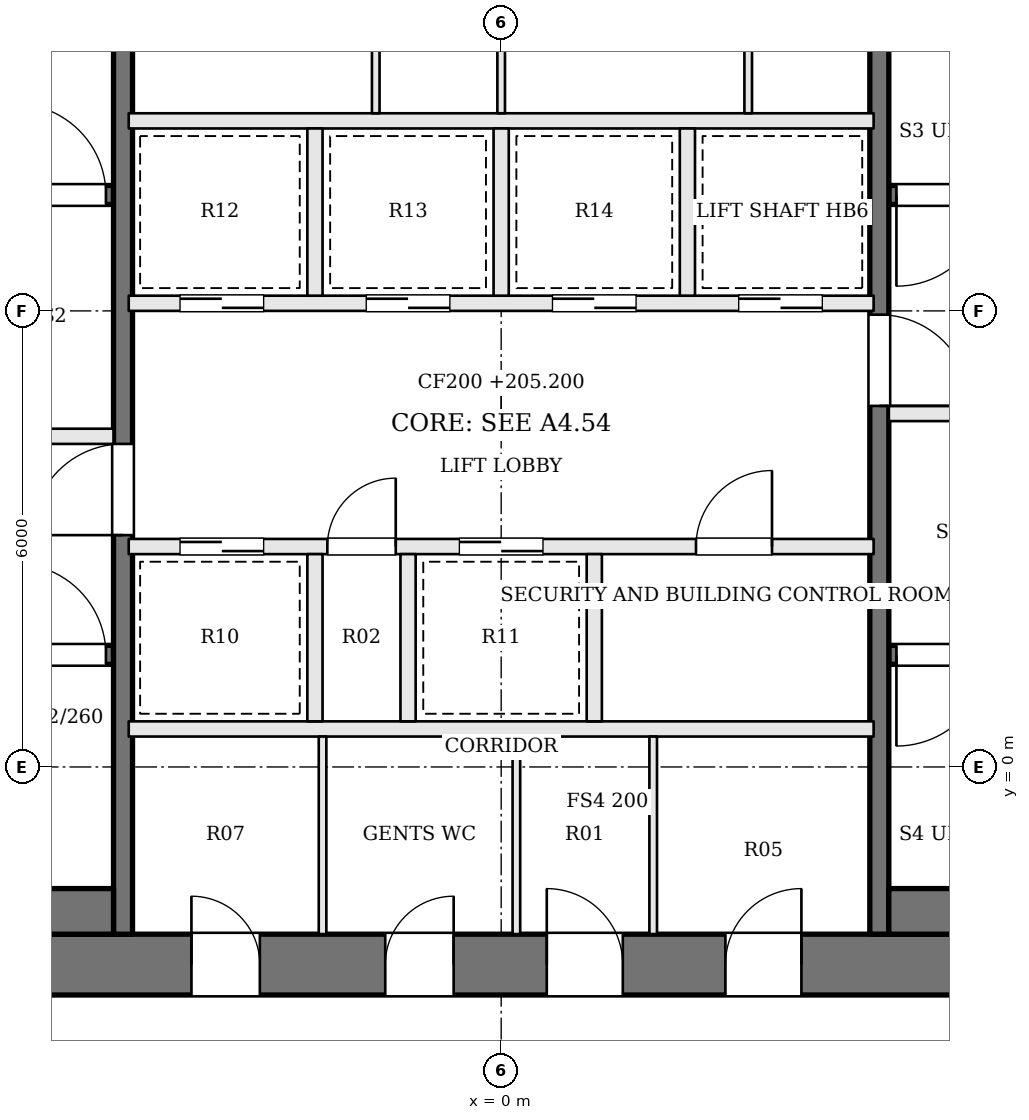
"""IFC4 building model, lengths in metres.
Left out: names, types, materials, properties, quantities, classifications, styles, units other than length and angle.
Written with IfcOpenShell. Run it as: python <this file> out.ifc"""

import sys

from ifc_helpers import new_model, si_unit, direction, frame, frame_2d, origin, place, context, subcontext, project, spatial, rectangle, extrude, element, fill, save


model = new_model("IFC4")
c1 = context("Model", 3, precision=1e-05, world=origin(), true_north=direction((0.0, 1.0)))
c2 = subcontext(c1, "Body", "Model", "MODEL_VIEW")
j1 = project(units=[si_unit("LENGTHUNIT", "METRE"), si_unit("PLANEANGLEUNIT", "RADIAN")], contexts=[c1])
p1 = place(None, origin())
s1 = spatial("IfcSite", under=j1, at=p1, CompositionType="ELEMENT")
p2 = place(p1, origin())
s2 = spatial("IfcBuilding", under=s1, at=p2, CompositionType="ELEMENT")
p3 = place(p2, frame((0.0, 0.0, 205.2)))
s3 = spatial("IfcBuildingStorey", under=s2, at=p3, CompositionType="ELEMENT", Elevation=205.2)
p4 = place(p3, frame((-13.0, -2.6, 0.0), z_axis=(0.0, 0.0, 1.0), x_axis=(1.0, 0.0, 0.0)))
e1 = element("IfcWall", 1, at=p4, inside=s3, PredefinedType="SHEAR", context=c2, shape_type="SweptSolid", body=[
    extrude(rectangle(XDim=26.0, YDim=0.8, at=frame_2d((13.0, 0.0))), origin(), (0.0, 0.0, 1.0), 3.9),
])
p5 = place(p4, frame((8.925, 0.0, 0.0)))
e2 = element("IfcOpeningElement", 2, at=p5, cuts=e1, PredefinedType="OPENING", context=c2, shape_type="SweptSolid", body=[
    extrude(rectangle(XDim=0.9, YDim=2.1, at=frame_2d((0.45, 1.05))), frame((0.0, 0.41, 0.0), z_axis=(0.0, -1.0, 0.0), x_axis=(1.0, 0.0, 0.0)), (0.0, 0.0, 1.0), 0.82),
])
p6 = place(p4, frame((11.475, 0.0, 0.0)))
e3 = element("IfcOpeningElement", 3, at=p6, cuts=e1, PredefinedType="OPENING", context=c2, shape_type="SweptSolid", body=[
    extrude(rectangle(XDim=0.9, YDim=2.1, at=frame_2d((0.45, 1.05))), frame((0.0, 0.41, 0.0), z_axis=(0.0, -1.0, 0.0), x_axis=(1.0, 0.0, 0.0)), (0.0, 0.0, 1.0), 0.82),
])
p7 = place(p4, frame((13.6, 0.0, 0.0)))
e4 = element("IfcOpeningElement", 4, at=p7, cuts=e1, PredefinedType="OPENING", context=c2, shape_type="SweptSolid", body=[
    extrude(rectangle(XDim=1.0, YDim=2.1, at=frame_2d((0.5, 1.05))), frame((0.0, 0.41, 0.0), z_axis=(0.0, -1.0, 0.0), x_axis=(1.0, 0.0, 0.0)), (0.0, 0.0, 1.0), 0.82),
])
p8 = place(p4, frame((15.95, 0.0, 0.0)))
e5 = element("IfcOpeningElement", 5, at=p8, cuts=e1, PredefinedType="OPENING", context=c2, shape_type="SweptSolid", body=[
    extrude(rectangle(XDim=1.0, YDim=2.1, at=frame_2d((0.5, 1.05))), frame((0.0, 0.41, 0.0), z_axis=(0.0, -1.0, 0.0), x_axis=(1.0, 0.0, 0.0)), (0.0, 0.0, 1.0), 0.82),
])
p9 = place(p3, frame((-12.2, 1.475, 0.0), z_axis=(0.0, 0.0, 1.0), x_axis=(1.0, 0.0, 0.0)))
e6 = element("IfcWall", 6, at=p9, inside=s3, PredefinedType="SOLIDWALL", context=c2, shape_type="SweptSolid", body=[
    extrude(rectangle(XDim=7.1, YDim=0.25, at=frame_2d((3.55, 0.0))), origin(), (0.0, 0.0, 1.0), 3.7),
])
p10 = place(p9, frame((5.8, 0.0, 0.0)))
e7 = element("IfcOpeningElement", 7, at=p10, cuts=e6, PredefinedType="OPENING", context=c2, shape_type="SweptSolid", body=[
    extrude(rectangle(XDim=1.2, YDim=2.1, at=frame_2d((0.6, 1.05))), frame((0.0, 0.135, 0.0), z_axis=(0.0, -1.0, 0.0), x_axis=(1.0, 0.0, 0.0)), (0.0, 0.0, 1.0), 0.27),
])
p11 = place(p3, frame((12.2, 7.525, 0.0), z_axis=(0.0, 0.0, 1.0), x_axis=(-1.0, 0.0, 0.0)))
e8 = element("IfcWall", 8, at=p11, inside=s3, PredefinedType="SOLIDWALL", context=c2, shape_type="SweptSolid", body=[
    extrude(rectangle(XDim=7.1, YDim=0.25, at=frame_2d((3.55, 0.0))), origin(), (0.0, 0.0, 1.0), 3.7),
])
p12 = place(p11, frame((5.8, 0.0, 0.0)))
e9 = element("IfcOpeningElement", 9, at=p12, cuts=e8, PredefinedType="OPENING", context=c2, shape_type="SweptSolid", body=[
    extrude(rectangle(XDim=1.2, YDim=2.1, at=frame_2d((0.6, 1.05))), frame((0.0, 0.135, 0.0), z_axis=(0.0, -1.0, 0.0), x_axis=(1.0, 0.0, 0.0)), (0.0, 0.0, 1.0), 0.27),
])
p13 = place(p3, frame((-12.2, 4.35, 0.0), z_axis=(0.0, 0.0, 1.0), x_axis=(1.0, 0.0, 0.0)))
e10 = element("IfcWall", 10, at=p13, inside=s3, PredefinedType="SOLIDWALL", context=c2, shape_type="SweptSolid", body=[
    extrude(rectangle(XDim=7.1, YDim=0.2, at=frame_2d((3.55, 0.0))), origin(), (0.0, 0.0, 1.0), 3.7),
])
p14 = place(p13, frame((4.4, 0.0, 0.0)))
e11 = element("IfcOpeningElement", 11, at=p14, cuts=e10, PredefinedType="OPENING", context=c2, shape_type="SweptSolid", body=[
    extrude(rectangle(XDim=1.2, YDim=2.1, at=frame_2d((0.6, 1.05))), frame((0.0, 0.11, 0.0), z_axis=(0.0, -1.0, 0.0), x_axis=(1.0, 0.0, 0.0)), (0.0, 0.0, 1.0), 0.22),
])
p15 = place(p13, frame((1.1, 0.0, 0.0)))
e12 = element("IfcOpeningElement", 12, at=p15, cuts=e10, PredefinedType="OPENING", context=c2, shape_type="SweptSolid", body=[
    extrude(rectangle(XDim=1.2, YDim=2.1, at=frame_2d((0.6, 1.05))), frame((0.0, 0.11, 0.0), z_axis=(0.0, -1.0, 0.0), x_axis=(1.0, 0.0, 0.0)), (0.0, 0.0, 1.0), 0.22),
])
p16 = place(p3, frame((12.2, 4.65, 0.0), z_axis=(0.0, 0.0, 1.0), x_axis=(-1.0, 0.0, 0.0)))
e13 = element("IfcWall", 13, at=p16, inside=s3, PredefinedType="SOLIDWALL", context=c2, shape_type="SweptSolid", body=[
    extrude(rectangle(XDim=7.1, YDim=0.2, at=frame_2d((3.55, 0.0))), origin(), (0.0, 0.0, 1.0), 3.7),
])
p17 = place(p16, frame((4.4, 0.0, 0.0)))
e14 = element("IfcOpeningElement", 14, at=p17, cuts=e13, PredefinedType="OPENING", context=c2, shape_type="SweptSolid", body=[
    extrude(rectangle(XDim=1.2, YDim=2.1, at=frame_2d((0.6, 1.05))), frame((0.0, 0.11, 0.0), z_axis=(0.0, -1.0, 0.0), x_axis=(1.0, 0.0, 0.0)), (0.0, 0.0, 1.0), 0.22),
])
p18 = place(p16, frame((1.1, 0.0, 0.0)))
e15 = element("IfcOpeningElement", 15, at=p18, cuts=e13, PredefinedType="OPENING", context=c2, shape_type="SweptSolid", body=[
    extrude(rectangle(XDim=1.2, YDim=2.1, at=frame_2d((0.6, 1.05))), frame((0.0, 0.11, 0.0), z_axis=(0.0, -1.0, 0.0), x_axis=(1.0, 0.0, 0.0)), (0.0, 0.0, 1.0), 0.22),
])
p19 = place(p3, frame((-12.2, 7.525, 0.0), z_axis=(0.0, 0.0, 1.0), x_axis=(1.0, 0.0, 0.0)))
e16 = element("IfcWall", 16, at=p19, inside=s3, PredefinedType="SOLIDWALL", context=c2, shape_type="SweptSolid", body=[
    extrude(rectangle(XDim=7.1, YDim=0.25, at=frame_2d((3.55, 0.0))), origin(), (0.0, 0.0, 1.0), 3.7),
])
p20 = place(p19, frame((5.8, 0.0, 0.0)))
e17 = element("IfcOpeningElement", 17, at=p20, cuts=e16, PredefinedType="OPENING", context=c2, shape_type="SweptSolid", body=[
    extrude(rectangle(XDim=1.2, YDim=2.1, at=frame_2d((0.6, 1.05))), frame((0.0, 0.135, 0.0), z_axis=(0.0, -1.0, 0.0), x_axis=(1.0, 0.0, 0.0)), (0.0, 0.0, 1.0), 0.27),
])
p21 = place(p3, frame((12.2, 1.475, 0.0), z_axis=(0.0, 0.0, 1.0), x_axis=(-1.0, 0.0, 0.0)))
e18 = element("IfcWall", 18, at=p21, inside=s3, PredefinedType="SOLIDWALL", context=c2, shape_type="SweptSolid", body=[
    extrude(rectangle(XDim=7.1, YDim=0.25, at=frame_2d((3.55, 0.0))), origin(), (0.0, 0.0, 1.0), 3.7),
])
p22 = place(p21, frame((5.8, 0.0, 0.0)))
e19 = element("IfcOpeningElement", 19, at=p22, cuts=e18, PredefinedType="OPENING", context=c2, shape_type="SweptSolid", body=[
    extrude(rectangle(XDim=1.2, YDim=2.1, at=frame_2d((0.6, 1.05))), frame((0.0, 0.135, 0.0), z_axis=(0.0, -1.0, 0.0), x_axis=(1.0, 0.0, 0.0)), (0.0, 0.0, 1.0), 0.27),
])
p23 = place(p3, frame((-4.975, -2.2, 0.0), z_axis=(0.0, 0.0, 1.0), x_axis=(0.0, 1.0, 0.0)))
e20 = element("IfcWall", 20, at=p23, inside=s3, PredefinedType="SOLIDWALL", context=c2, shape_type="SweptSolid", body=[
    extrude(rectangle(XDim=13.4, YDim=0.25, at=frame_2d((6.7, 0.0))), origin(), (0.0, 0.0, 1.0), 3.7),
])
p24 = place(p23, frame((5.25, 0.0, 0.0)))
e21 = element("IfcOpeningElement", 21, at=p24, cuts=e20, PredefinedType="OPENING", context=c2, shape_type="SweptSolid", body=[
    extrude(rectangle(XDim=1.2, YDim=2.1, at=frame_2d((0.6, 1.05))), frame((0.0, 0.135, 0.0), z_axis=(0.0, -1.0, 0.0), x_axis=(1.0, 0.0, 0.0)), (0.0, 0.0, 1.0), 0.27),
])
p25 = place(p3, frame((4.975, 11.2, 0.0), z_axis=(0.0, 0.0, 1.0), x_axis=(0.0, -1.0, 0.0)))
e22 = element("IfcWall", 22, at=p25, inside=s3, PredefinedType="SOLIDWALL", context=c2, shape_type="SweptSolid", body=[
    extrude(rectangle(XDim=13.4, YDim=0.25, at=frame_2d((6.7, 0.0))), origin(), (0.0, 0.0, 1.0), 3.7),
])
p26 = place(p25, frame((5.25, 0.0, 0.0)))
e23 = element("IfcOpeningElement", 23, at=p26, cuts=e22, PredefinedType="OPENING", context=c2, shape_type="SweptSolid", body=[
    extrude(rectangle(XDim=1.2, YDim=2.1, at=frame_2d((0.6, 1.05))), frame((0.0, 0.135, 0.0), z_axis=(0.0, -1.0, 0.0), x_axis=(1.0, 0.0, 0.0)), (0.0, 0.0, 1.0), 0.27),
])
for number, where, z_axis, x_axis in (
    (24, (-12.2, -1.9, 0.0), (0.0, 0.0, 1.0), (1.0, 0.0, 0.0)),
    (25, (12.2, -1.9, 0.0), (0.0, 0.0, 1.0), (-1.0, 0.0, 0.0)),
):
    element("IfcWall", number, at=place(p3, frame(where, z_axis=z_axis, x_axis=x_axis)), inside=s3, PredefinedType="SOLIDWALL", context=c2, shape_type="SweptSolid", body=[
        extrude(rectangle(XDim=7.1, YDim=0.6, at=frame_2d((3.55, 0.0))), origin(), (0.0, 0.0, 1.0), 3.7),
    ])
p27 = place(p3, frame((-4.9, 0.5, 0.0), z_axis=(0.0, 0.0, 1.0), x_axis=(1.0, 0.0, 0.0)))
e26 = element("IfcWall", 26, at=p27, inside=s3, PredefinedType="SOLIDWALL", context=c2, shape_type="SweptSolid", body=[
    extrude(rectangle(XDim=9.8, YDim=0.2, at=frame_2d((4.9, 0.0))), origin(), (0.0, 0.0, 1.0), 3.7),
])
p28 = place(p3, frame((-4.9, 2.9, 0.0), z_axis=(0.0, 0.0, 1.0), x_axis=(1.0, 0.0, 0.0)))
e27 = element("IfcWall", 27, at=p28, inside=s3, PredefinedType="SOLIDWALL", context=c2, shape_type="SweptSolid", body=[
    extrude(rectangle(XDim=9.8, YDim=0.2, at=frame_2d((4.9, 0.0))), origin(), (0.0, 0.0, 1.0), 3.7),
])
p29 = place(p28, frame((0.675, 0.0, 0.0)))
e28 = element("IfcOpeningElement", 28, at=p29, cuts=e27, PredefinedType="OPENING", context=c2, shape_type="SweptSolid", body=[
    extrude(rectangle(XDim=1.1, YDim=2.1, at=frame_2d((0.55, 1.05))), frame((0.0, 0.11, 0.0), z_axis=(0.0, -1.0, 0.0), x_axis=(1.0, 0.0, 0.0)), (0.0, 0.0, 1.0), 0.22),
])
p30 = place(p28, frame((2.613, 0.0, 0.0)))
e29 = element("IfcOpeningElement", 29, at=p30, cuts=e27, PredefinedType="OPENING", context=c2, shape_type="SweptSolid", body=[
    extrude(rectangle(XDim=0.9, YDim=2.1, at=frame_2d((0.45, 1.05))), frame((0.0, 0.11, 0.0), z_axis=(0.0, -1.0, 0.0), x_axis=(1.0, 0.0, 0.0)), (0.0, 0.0, 1.0), 0.22),
])
p31 = place(p28, frame((4.35, 0.0, 0.0)))
e30 = element("IfcOpeningElement", 30, at=p31, cuts=e27, PredefinedType="OPENING", context=c2, shape_type="SweptSolid", body=[
    extrude(rectangle(XDim=1.1, YDim=2.1, at=frame_2d((0.55, 1.05))), frame((0.0, 0.11, 0.0), z_axis=(0.0, -1.0, 0.0), x_axis=(1.0, 0.0, 0.0)), (0.0, 0.0, 1.0), 0.22),
])
p32 = place(p28, frame((7.463, 0.0, 0.0)))
e31 = element("IfcOpeningElement", 31, at=p32, cuts=e27, PredefinedType="OPENING", context=c2, shape_type="SweptSolid", body=[
    extrude(rectangle(XDim=1.0, YDim=2.1, at=frame_2d((0.5, 1.05))), frame((0.0, 0.11, 0.0), z_axis=(0.0, -1.0, 0.0), x_axis=(1.0, 0.0, 0.0)), (0.0, 0.0, 1.0), 0.22),
])
p33 = place(p3, frame((-4.9, 6.1, 0.0), z_axis=(0.0, 0.0, 1.0), x_axis=(1.0, 0.0, 0.0)))
e32 = element("IfcWall", 32, at=p33, inside=s3, PredefinedType="SOLIDWALL", context=c2, shape_type="SweptSolid", body=[
    extrude(rectangle(XDim=9.8, YDim=0.2, at=frame_2d((4.9, 0.0))), origin(), (0.0, 0.0, 1.0), 3.7),
])
p34 = place(p33, frame((0.675, 0.0, 0.0)))
e33 = element("IfcOpeningElement", 33, at=p34, cuts=e32, PredefinedType="OPENING", context=c2, shape_type="SweptSolid", body=[
    extrude(rectangle(XDim=1.1, YDim=2.1, at=frame_2d((0.55, 1.05))), frame((0.0, 0.11, 0.0), z_axis=(0.0, -1.0, 0.0), x_axis=(1.0, 0.0, 0.0)), (0.0, 0.0, 1.0), 0.22),
])
p35 = place(p33, frame((3.125, 0.0, 0.0)))
e34 = element("IfcOpeningElement", 34, at=p35, cuts=e32, PredefinedType="OPENING", context=c2, shape_type="SweptSolid", body=[
    extrude(rectangle(XDim=1.1, YDim=2.1, at=frame_2d((0.55, 1.05))), frame((0.0, 0.11, 0.0), z_axis=(0.0, -1.0, 0.0), x_axis=(1.0, 0.0, 0.0)), (0.0, 0.0, 1.0), 0.22),
])
p36 = place(p33, frame((5.575, 0.0, 0.0)))
e35 = element("IfcOpeningElement", 35, at=p36, cuts=e32, PredefinedType="OPENING", context=c2, shape_type="SweptSolid", body=[
    extrude(rectangle(XDim=1.1, YDim=2.1, at=frame_2d((0.55, 1.05))), frame((0.0, 0.11, 0.0), z_axis=(0.0, -1.0, 0.0), x_axis=(1.0, 0.0, 0.0)), (0.0, 0.0, 1.0), 0.22),
])
p37 = place(p33, frame((8.025, 0.0, 0.0)))
e36 = element("IfcOpeningElement", 36, at=p37, cuts=e32, PredefinedType="OPENING", context=c2, shape_type="SweptSolid", body=[
    extrude(rectangle(XDim=1.1, YDim=2.1, at=frame_2d((0.55, 1.05))), frame((0.0, 0.11, 0.0), z_axis=(0.0, -1.0, 0.0), x_axis=(1.0, 0.0, 0.0)), (0.0, 0.0, 1.0), 0.22),
])
p38 = place(p3, frame((-4.9, 8.5, 0.0), z_axis=(0.0, 0.0, 1.0), x_axis=(1.0, 0.0, 0.0)))
e37 = element("IfcWall", 37, at=p38, inside=s3, PredefinedType="SOLIDWALL", context=c2, shape_type="SweptSolid", body=[
    extrude(rectangle(XDim=9.8, YDim=0.2, at=frame_2d((4.9, 0.0))), origin(), (0.0, 0.0, 1.0), 3.7),
])
for number, where, z_axis, x_axis in (
    (38, (-2.45, 0.6, 0.0), (0.0, 0.0, 1.0), (0.0, 1.0, 0.0)),
    (39, (-1.225, 0.6, 0.0), (0.0, 0.0, 1.0), (0.0, 1.0, 0.0)),
    (40, (1.225, 0.6, 0.0), (0.0, 0.0, 1.0), (0.0, 1.0, 0.0)),
    (41, (-2.45, 6.2, 0.0), (0.0, 0.0, 1.0), (0.0, 1.0, 0.0)),
    (42, (0.0, 6.2, 0.0), (0.0, 0.0, 1.0), (0.0, 1.0, 0.0)),
    (43, (2.45, 6.2, 0.0), (0.0, 0.0, 1.0), (0.0, 1.0, 0.0)),
):
    element("IfcWall", number, at=place(p3, frame(where, z_axis=z_axis, x_axis=x_axis)), inside=s3, PredefinedType="SOLIDWALL", context=c2, shape_type="SweptSolid", body=[
        extrude(rectangle(XDim=2.2, YDim=0.2, at=frame_2d((1.1, 0.0))), origin(), (0.0, 0.0, 1.0), 3.7),
    ])
for number, where, z_axis, x_axis in (
    (44, (-2.35, -2.2, 0.0), (0.0, 0.0, 1.0), (0.0, 1.0, 0.0)),
    (45, (0.2, -2.2, 0.0), (0.0, 0.0, 1.0), (0.0, 1.0, 0.0)),
    (46, (2.0, -2.2, 0.0), (0.0, 0.0, 1.0), (0.0, 1.0, 0.0)),
    (47, (-1.65, 8.6, 0.0), (0.0, 0.0, 1.0), (0.0, 1.0, 0.0)),
    (48, (0.0, 8.6, 0.0), (0.0, 0.0, 1.0), (0.0, 1.0, 0.0)),
    (49, (3.25, 8.6, 0.0), (0.0, 0.0, 1.0), (0.0, 1.0, 0.0)),
):
    element("IfcWall", number, at=place(p3, frame(where, z_axis=z_axis, x_axis=x_axis)), inside=s3, PredefinedType="PARTITIONING", context=c2, shape_type="SweptSolid", body=[
        extrude(rectangle(XDim=2.6, YDim=0.1, at=frame_2d((1.3, 0.0))), origin(), (0.0, 0.0, 1.0), 3.7),
    ])
p39 = place(p24, origin())
e50 = element("IfcDoor", 50, at=p39, inside=s3, OperationType="SINGLE_SWING_LEFT", PredefinedType="DOOR", context=c2, shape_type="SweptSolid", body=[
    extrude(rectangle(XDim=1.2, YDim=2.1, at=frame_2d((0.6, 1.05))), frame((0.0, 0.025, 0.0), z_axis=(0.0, -1.0, 0.0), x_axis=(1.0, 0.0, 0.0)), (0.0, 0.0, 1.0), 0.05),
])
fill(e21, e50)
p40 = place(p26, origin())
e51 = element("IfcDoor", 51, at=p40, inside=s3, OperationType="SINGLE_SWING_RIGHT", PredefinedType="DOOR", context=c2, shape_type="SweptSolid", body=[
    extrude(rectangle(XDim=1.2, YDim=2.1, at=frame_2d((0.6, 1.05))), frame((0.0, 0.025, 0.0), z_axis=(0.0, -1.0, 0.0), x_axis=(1.0, 0.0, 0.0)), (0.0, 0.0, 1.0), 0.05),
])
fill(e23, e51)
p41 = place(p10, origin())
e52 = element("IfcDoor", 52, at=p41, inside=s3, OperationType="SINGLE_SWING_LEFT", PredefinedType="DOOR", context=c2, shape_type="SweptSolid", body=[
    extrude(rectangle(XDim=1.2, YDim=2.1, at=frame_2d((0.6, 1.05))), frame((0.0, 0.025, 0.0), z_axis=(0.0, -1.0, 0.0), x_axis=(1.0, 0.0, 0.0)), (0.0, 0.0, 1.0), 0.05),
])
fill(e7, e52)
p42 = place(p12, origin())
e53 = element("IfcDoor", 53, at=p42, inside=s3, OperationType="SINGLE_SWING_RIGHT", PredefinedType="DOOR", context=c2, shape_type="SweptSolid", body=[
    extrude(rectangle(XDim=1.2, YDim=2.1, at=frame_2d((0.6, 1.05))), frame((0.0, 0.025, 0.0), z_axis=(0.0, -1.0, 0.0), x_axis=(1.0, 0.0, 0.0)), (0.0, 0.0, 1.0), 0.05),
])
fill(e9, e53)
p43 = place(p20, origin())
e54 = element("IfcDoor", 54, at=p43, inside=s3, OperationType="SINGLE_SWING_LEFT", PredefinedType="DOOR", context=c2, shape_type="SweptSolid", body=[
    extrude(rectangle(XDim=1.2, YDim=2.1, at=frame_2d((0.6, 1.05))), frame((0.0, 0.025, 0.0), z_axis=(0.0, -1.0, 0.0), x_axis=(1.0, 0.0, 0.0)), (0.0, 0.0, 1.0), 0.05),
])
fill(e17, e54)
p44 = place(p22, origin())
e55 = element("IfcDoor", 55, at=p44, inside=s3, OperationType="SINGLE_SWING_RIGHT", PredefinedType="DOOR", context=c2, shape_type="SweptSolid", body=[
    extrude(rectangle(XDim=1.2, YDim=2.1, at=frame_2d((0.6, 1.05))), frame((0.0, 0.025, 0.0), z_axis=(0.0, -1.0, 0.0), x_axis=(1.0, 0.0, 0.0)), (0.0, 0.0, 1.0), 0.05),
])
fill(e19, e55)
p45 = place(p29, origin())
e56 = element("IfcDoor", 56, at=p45, inside=s3, OperationType="SLIDING_TO_RIGHT", PredefinedType="DOOR", context=c2, shape_type="SweptSolid", body=[
    extrude(rectangle(XDim=1.1, YDim=2.1, at=frame_2d((0.55, 1.05))), frame((0.0, 0.025, 0.0), z_axis=(0.0, -1.0, 0.0), x_axis=(1.0, 0.0, 0.0)), (0.0, 0.0, 1.0), 0.05),
])
fill(e28, e56)
p46 = place(p30, origin())
e57 = element("IfcDoor", 57, at=p46, inside=s3, OperationType="SINGLE_SWING_RIGHT", PredefinedType="DOOR", context=c2, shape_type="SweptSolid", body=[
    extrude(rectangle(XDim=0.9, YDim=2.1, at=frame_2d((0.45, 1.05))), frame((0.0, 0.025, 0.0), z_axis=(0.0, -1.0, 0.0), x_axis=(1.0, 0.0, 0.0)), (0.0, 0.0, 1.0), 0.05),
])
fill(e29, e57)
p47 = place(p31, origin())
e58 = element("IfcDoor", 58, at=p47, inside=s3, OperationType="SLIDING_TO_LEFT", PredefinedType="DOOR", context=c2, shape_type="SweptSolid", body=[
    extrude(rectangle(XDim=1.1, YDim=2.1, at=frame_2d((0.55, 1.05))), frame((0.0, 0.025, 0.0), z_axis=(0.0, -1.0, 0.0), x_axis=(1.0, 0.0, 0.0)), (0.0, 0.0, 1.0), 0.05),
])
fill(e30, e58)
p48 = place(p32, origin())
e59 = element("IfcDoor", 59, at=p48, inside=s3, OperationType="SINGLE_SWING_RIGHT", PredefinedType="DOOR", context=c2, shape_type="SweptSolid", body=[
    extrude(rectangle(XDim=1.0, YDim=2.1, at=frame_2d((0.5, 1.05))), frame((0.0, 0.025, 0.0), z_axis=(0.0, -1.0, 0.0), x_axis=(1.0, 0.0, 0.0)), (0.0, 0.0, 1.0), 0.05),
])
fill(e31, e59)
p49 = place(p34, origin())
e60 = element("IfcDoor", 60, at=p49, inside=s3, OperationType="SLIDING_TO_RIGHT", PredefinedType="DOOR", context=c2, shape_type="SweptSolid", body=[
    extrude(rectangle(XDim=1.1, YDim=2.1, at=frame_2d((0.55, 1.05))), frame((0.0, 0.025, 0.0), z_axis=(0.0, -1.0, 0.0), x_axis=(1.0, 0.0, 0.0)), (0.0, 0.0, 1.0), 0.05),
])
fill(e33, e60)
p50 = place(p35, origin())
e61 = element("IfcDoor", 61, at=p50, inside=s3, OperationType="SLIDING_TO_LEFT", PredefinedType="DOOR", context=c2, shape_type="SweptSolid", body=[
    extrude(rectangle(XDim=1.1, YDim=2.1, at=frame_2d((0.55, 1.05))), frame((0.0, 0.025, 0.0), z_axis=(0.0, -1.0, 0.0), x_axis=(1.0, 0.0, 0.0)), (0.0, 0.0, 1.0), 0.05),
])
fill(e34, e61)
p51 = place(p36, origin())
e62 = element("IfcDoor", 62, at=p51, inside=s3, OperationType="SLIDING_TO_RIGHT", PredefinedType="DOOR", context=c2, shape_type="SweptSolid", body=[
    extrude(rectangle(XDim=1.1, YDim=2.1, at=frame_2d((0.55, 1.05))), frame((0.0, 0.025, 0.0), z_axis=(0.0, -1.0, 0.0), x_axis=(1.0, 0.0, 0.0)), (0.0, 0.0, 1.0), 0.05),
])
fill(e35, e62)
p52 = place(p37, origin())
e63 = element("IfcDoor", 63, at=p52, inside=s3, OperationType="SLIDING_TO_LEFT", PredefinedType="DOOR", context=c2, shape_type="SweptSolid", body=[
    extrude(rectangle(XDim=1.1, YDim=2.1, at=frame_2d((0.55, 1.05))), frame((0.0, 0.025, 0.0), z_axis=(0.0, -1.0, 0.0), x_axis=(1.0, 0.0, 0.0)), (0.0, 0.0, 1.0), 0.05),
])
fill(e36, e63)
p53 = place(p5, origin())
e64 = element("IfcDoor", 64, at=p53, inside=s3, OperationType="SINGLE_SWING_LEFT", PredefinedType="DOOR", context=c2, shape_type="SweptSolid", body=[
    extrude(rectangle(XDim=0.9, YDim=2.1, at=frame_2d((0.45, 1.05))), frame((0.0, 0.025, 0.0), z_axis=(0.0, -1.0, 0.0), x_axis=(1.0, 0.0, 0.0)), (0.0, 0.0, 1.0), 0.05),
])
fill(e2, e64)
p54 = place(p6, origin())
e65 = element("IfcDoor", 65, at=p54, inside=s3, OperationType="SINGLE_SWING_RIGHT", PredefinedType="DOOR", context=c2, shape_type="SweptSolid", body=[
    extrude(rectangle(XDim=0.9, YDim=2.1, at=frame_2d((0.45, 1.05))), frame((0.0, 0.025, 0.0), z_axis=(0.0, -1.0, 0.0), x_axis=(1.0, 0.0, 0.0)), (0.0, 0.0, 1.0), 0.05),
])
fill(e3, e65)
p55 = place(p7, origin())
e66 = element("IfcDoor", 66, at=p55, inside=s3, OperationType="SINGLE_SWING_LEFT", PredefinedType="DOOR", context=c2, shape_type="SweptSolid", body=[
    extrude(rectangle(XDim=1.0, YDim=2.1, at=frame_2d((0.5, 1.05))), frame((0.0, 0.025, 0.0), z_axis=(0.0, -1.0, 0.0), x_axis=(1.0, 0.0, 0.0)), (0.0, 0.0, 1.0), 0.05),
])
fill(e4, e66)
p56 = place(p8, origin())
e67 = element("IfcDoor", 67, at=p56, inside=s3, OperationType="SINGLE_SWING_RIGHT", PredefinedType="DOOR", context=c2, shape_type="SweptSolid", body=[
    extrude(rectangle(XDim=1.0, YDim=2.1, at=frame_2d((0.5, 1.05))), frame((0.0, 0.025, 0.0), z_axis=(0.0, -1.0, 0.0), x_axis=(1.0, 0.0, 0.0)), (0.0, 0.0, 1.0), 0.05),
])
fill(e5, e67)
save(model, sys.argv[1])
